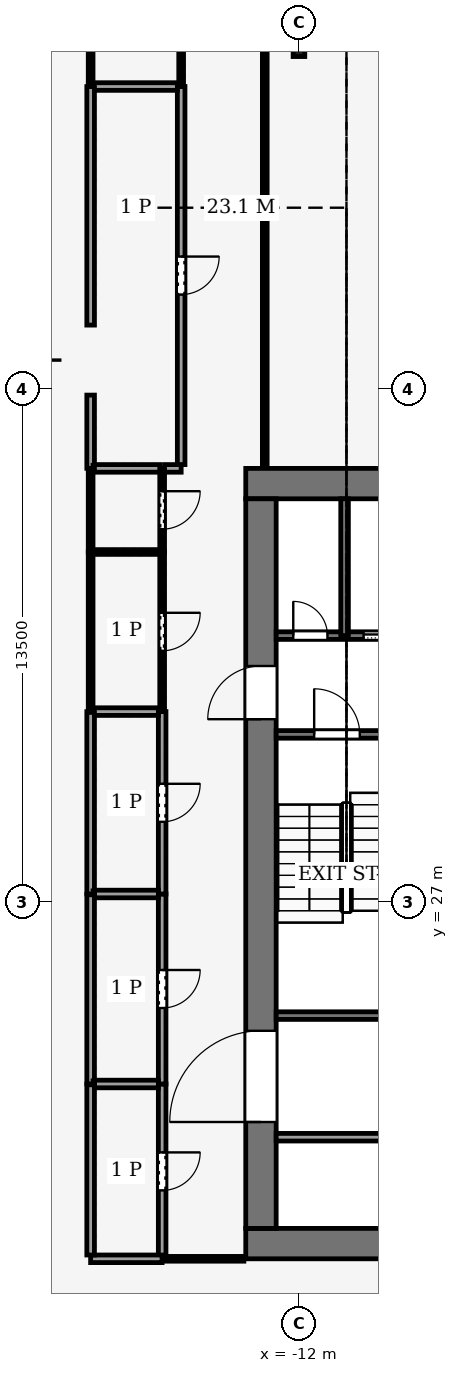
"""IFC4 building model, lengths in metres.
Left out: names, types, materials, properties, quantities, classifications, styles, units other than length and angle.
Written with IfcOpenShell. Run it as: python <this file> out.ifc"""

import sys

from ifc_helpers import new_model, si_unit, direction, frame, frame_2d, origin, origin_2d, place, context, subcontext, project, spatial, rectangle, hollow_rectangle, i_section, extrude, element, fill, save


model = new_model("IFC4")
c1 = context("Model", 3, precision=1e-05, world=origin(), true_north=direction((0.0, 1.0)))
c2 = subcontext(c1, "Body", "Model", "MODEL_VIEW")
j1 = project(units=[si_unit("LENGTHUNIT", "METRE"), si_unit("PLANEANGLEUNIT", "RADIAN")], contexts=[c1])
p1 = place(None, origin())
s1 = spatial("IfcSite", under=j1, at=p1, CompositionType="ELEMENT")
p2 = place(p1, origin())
s2 = spatial("IfcBuilding", under=s1, at=p2, CompositionType="ELEMENT")
p3 = place(p2, frame((0.0, 0.0, 282.0)))
s3 = spatial("IfcBuildingStorey", under=s2, at=p3, CompositionType="ELEMENT", Elevation=282.0)
for number, where, z_axis, x_axis in (
    (1, (-13.4, 18.0, -0.25), (0.0, 0.0, 1.0), (1.0, 0.0, 0.0)),
    (2, (-13.4, 38.0, -0.25), (0.0, 0.0, 1.0), (1.0, 0.0, 0.0)),
):
    element("IfcWall", number, at=place(p3, frame(where, z_axis=z_axis, x_axis=x_axis)), inside=s3, PredefinedType="SHEAR", context=c2, shape_type="SweptSolid", body=[
        extrude(rectangle(XDim=26.8, YDim=0.8, at=frame_2d((13.4, 0.0))), origin(), (0.0, 0.0, 1.0), 7.12),
    ])
p4 = place(p3, frame((-13.0, 18.4, -0.25), z_axis=(0.0, 0.0, 1.0), x_axis=(0.0, 1.0, 0.0)))
e3 = element("IfcWall", 3, at=p4, inside=s3, PredefinedType="SHEAR", context=c2, shape_type="SweptSolid", body=[
    extrude(rectangle(XDim=19.2, YDim=0.8, at=frame_2d((9.6, 0.0))), origin(), (0.0, 0.0, 1.0), 7.12),
])
p5 = place(p4, frame((2.8, 0.0, 0.25)))
e4 = element("IfcOpeningElement", 4, at=p5, cuts=e3, PredefinedType="OPENING", context=c2, shape_type="SweptSolid", body=[
    extrude(rectangle(XDim=2.4, YDim=2.4, at=frame_2d((1.2, 1.2))), frame((0.0, 0.41, 0.0), z_axis=(0.0, -1.0, 0.0), x_axis=(1.0, 0.0, 0.0)), (0.0, 0.0, 1.0), 0.82),
])
p6 = place(p4, frame((13.4, 0.0, 0.25)))
e5 = element("IfcOpeningElement", 5, at=p6, cuts=e3, PredefinedType="OPENING", context=c2, shape_type="SweptSolid", body=[
    extrude(rectangle(XDim=1.4, YDim=2.2, at=frame_2d((0.7, 1.1))), frame((0.0, 0.41, 0.0), z_axis=(0.0, -1.0, 0.0), x_axis=(1.0, 0.0, 0.0)), (0.0, 0.0, 1.0), 0.82),
])
p7 = place(p3, frame((-21.0, 41.25, 0.223), z_axis=(0.386877430339, 0.0, 0.922131147882), x_axis=(0.0, 1.0, 0.0)))
e6 = element("IfcColumn", 6, at=p7, inside=s3, PredefinedType="COLUMN", context=c2, shape_type="SweptSolid", body=[
    extrude(hollow_rectangle(XDim=1.0, YDim=1.0, WallThickness=0.045, at=origin_2d()), origin(), (0.0, 0.0, 1.0), 7.108),
])
p8 = place(p3, frame((-12.0, 49.5, 0.0), z_axis=(0.0, 0.0, 1.0), x_axis=(1.0, 0.0, 0.0)))
e7 = element("IfcColumn", 7, at=p8, inside=s3, PredefinedType="COLUMN", context=c2, shape_type="SweptSolid", body=[
    extrude(i_section(OverallWidth=0.306, OverallDepth=0.524, WebThickness=0.012, FlangeThickness=0.04, FilletRadius=0.027, at=origin_2d()), origin(), (0.0, 0.0, 1.0), 7.0),
])
p9 = place(p3, frame((-12.6, 20.8, 0.0), z_axis=(0.0, 0.0, 1.0), x_axis=(1.0, 0.0, 0.0)))
e8 = element("IfcWall", 8, at=p9, inside=s3, PredefinedType="PARTITIONING", context=c2, shape_type="SweptSolid", body=[
    extrude(rectangle(XDim=6.6, YDim=0.2, at=frame_2d((3.3, 0.0))), origin(), (0.0, 0.0, 1.0), 6.87),
])
p10 = place(p9, frame((2.8, 0.0, 0.0)))
e9 = element("IfcOpeningElement", 9, at=p10, cuts=e8, PredefinedType="OPENING", context=c2, shape_type="SweptSolid", body=[
    extrude(rectangle(XDim=1.0, YDim=2.1, at=frame_2d((0.5, 1.05))), frame((0.0, 0.11, 0.0), z_axis=(0.0, -1.0, 0.0), x_axis=(1.0, 0.0, 0.0)), (0.0, 0.0, 1.0), 0.22),
])
p11 = place(p3, frame((-12.6, 24.0, 0.0), z_axis=(0.0, 0.0, 1.0), x_axis=(1.0, 0.0, 0.0)))
e10 = element("IfcWall", 10, at=p11, inside=s3, PredefinedType="PARTITIONING", context=c2, shape_type="SweptSolid", body=[
    extrude(rectangle(XDim=6.6, YDim=0.2, at=frame_2d((3.3, 0.0))), origin(), (0.0, 0.0, 1.0), 6.87),
])
p12 = place(p11, frame((4.7, 0.0, 0.0)))
e11 = element("IfcOpeningElement", 11, at=p12, cuts=e10, PredefinedType="OPENING", context=c2, shape_type="SweptSolid", body=[
    extrude(rectangle(XDim=1.0, YDim=2.1, at=frame_2d((0.5, 1.05))), frame((0.0, 0.11, 0.0), z_axis=(0.0, -1.0, 0.0), x_axis=(1.0, 0.0, 0.0)), (0.0, 0.0, 1.0), 0.22),
])
p13 = place(p3, frame((-12.6, 31.4, 0.0), z_axis=(0.0, 0.0, 1.0), x_axis=(1.0, 0.0, 0.0)))
e12 = element("IfcWall", 12, at=p13, inside=s3, PredefinedType="PARTITIONING", context=c2, shape_type="SweptSolid", body=[
    extrude(rectangle(XDim=6.6, YDim=0.2, at=frame_2d((3.3, 0.0))), origin(), (0.0, 0.0, 1.0), 6.87),
])
p14 = place(p13, frame((1.0, 0.0, 0.0)))
e13 = element("IfcOpeningElement", 13, at=p14, cuts=e12, PredefinedType="OPENING", context=c2, shape_type="SweptSolid", body=[
    extrude(rectangle(XDim=1.2, YDim=2.2, at=frame_2d((0.6, 1.1))), frame((0.0, 0.11, 0.0), z_axis=(0.0, -1.0, 0.0), x_axis=(1.0, 0.0, 0.0)), (0.0, 0.0, 1.0), 0.22),
])
p15 = place(p3, frame((-12.6, 34.0, 0.0), z_axis=(0.0, 0.0, 1.0), x_axis=(1.0, 0.0, 0.0)))
e14 = element("IfcWall", 14, at=p15, inside=s3, PredefinedType="PARTITIONING", context=c2, shape_type="SweptSolid", body=[
    extrude(rectangle(XDim=6.6, YDim=0.2, at=frame_2d((3.3, 0.0))), origin(), (0.0, 0.0, 1.0), 6.87),
])
p16 = place(p15, frame((4.7, 0.0, 0.0)))
e15 = element("IfcOpeningElement", 15, at=p16, cuts=e14, PredefinedType="OPENING", context=c2, shape_type="SweptSolid", body=[
    extrude(rectangle(XDim=1.4, YDim=2.2, at=frame_2d((0.7, 1.1))), frame((0.0, 0.11, 0.0), z_axis=(0.0, -1.0, 0.0), x_axis=(1.0, 0.0, 0.0)), (0.0, 0.0, 1.0), 0.22),
])
p17 = place(p15, frame((2.3, 0.0, 0.0)))
e16 = element("IfcOpeningElement", 16, at=p17, cuts=e14, PredefinedType="OPENING", context=c2, shape_type="SweptSolid", body=[
    extrude(rectangle(XDim=1.4, YDim=2.2, at=frame_2d((0.7, 1.1))), frame((0.0, 0.11, 0.0), z_axis=(0.0, -1.0, 0.0), x_axis=(1.0, 0.0, 0.0)), (0.0, 0.0, 1.0), 0.22),
])
p18 = place(p15, frame((0.45, 0.0, 0.0)))
e17 = element("IfcOpeningElement", 17, at=p18, cuts=e14, PredefinedType="OPENING", context=c2, shape_type="SweptSolid", body=[
    extrude(rectangle(XDim=0.9, YDim=2.1, at=frame_2d((0.45, 1.05))), frame((0.0, 0.11, 0.0), z_axis=(0.0, -1.0, 0.0), x_axis=(1.0, 0.0, 0.0)), (0.0, 0.0, 1.0), 0.22),
])
p19 = place(p3, frame((-10.8, 34.0, 0.0), z_axis=(0.0, 0.0, 1.0), x_axis=(0.0, 1.0, 0.0)))
e18 = element("IfcWall", 18, at=p19, inside=s3, PredefinedType="PARTITIONING", context=c2, shape_type="SweptSolid", body=[
    extrude(rectangle(XDim=3.6, YDim=0.2, at=frame_2d((1.8, 0.0))), origin(), (0.0, 0.0, 1.0), 6.87),
])
p20 = place(p3, frame((-15.6, 22.2, 0.0), z_axis=(0.0, 0.0, 1.0), x_axis=(0.0, -1.0, 0.0)))
e19 = element("IfcWall", 19, at=p20, inside=s3, PredefinedType="PARTITIONING", context=c2, shape_type="SweptSolid", body=[
    extrude(rectangle(XDim=4.6, YDim=0.2, at=frame_2d((2.3, 0.0))), origin(), (0.0, 0.0, 1.0), 6.14),
])
p21 = place(p20, frame((1.8, 0.0, 0.0)))
e20 = element("IfcOpeningElement", 20, at=p21, cuts=e19, PredefinedType="OPENING", context=c2, shape_type="SweptSolid", body=[
    extrude(rectangle(XDim=1.0, YDim=2.1, at=frame_2d((0.5, 1.05))), frame((0.0, 0.11, 0.0), z_axis=(0.0, -1.0, 0.0), x_axis=(1.0, 0.0, 0.0)), (0.0, 0.0, 1.0), 0.22),
])
p22 = place(p3, frame((-15.6, 27.2, 0.0), z_axis=(0.0, 0.0, 1.0), x_axis=(0.0, -1.0, 0.0)))
e21 = element("IfcWall", 21, at=p22, inside=s3, PredefinedType="PARTITIONING", context=c2, shape_type="SweptSolid", body=[
    extrude(rectangle(XDim=5.0, YDim=0.2, at=frame_2d((2.5, 0.0))), origin(), (0.0, 0.0, 1.0), 6.48),
])
p23 = place(p22, frame((2.0, 0.0, 0.0)))
e22 = element("IfcOpeningElement", 22, at=p23, cuts=e21, PredefinedType="OPENING", context=c2, shape_type="SweptSolid", body=[
    extrude(rectangle(XDim=1.0, YDim=2.1, at=frame_2d((0.5, 1.05))), frame((0.0, 0.11, 0.0), z_axis=(0.0, -1.0, 0.0), x_axis=(1.0, 0.0, 0.0)), (0.0, 0.0, 1.0), 0.22),
])
p24 = place(p3, frame((-15.6, 32.0, 0.0), z_axis=(0.0, 0.0, 1.0), x_axis=(0.0, -1.0, 0.0)))
e23 = element("IfcWall", 23, at=p24, inside=s3, PredefinedType="PARTITIONING", context=c2, shape_type="SweptSolid", body=[
    extrude(rectangle(XDim=4.8, YDim=0.2, at=frame_2d((2.4, 0.0))), origin(), (0.0, 0.0, 1.0), 6.48),
])
p25 = place(p24, frame((1.9, 0.0, 0.0)))
e24 = element("IfcOpeningElement", 24, at=p25, cuts=e23, PredefinedType="OPENING", context=c2, shape_type="SweptSolid", body=[
    extrude(rectangle(XDim=1.0, YDim=2.1, at=frame_2d((0.5, 1.05))), frame((0.0, 0.11, 0.0), z_axis=(0.0, -1.0, 0.0), x_axis=(1.0, 0.0, 0.0)), (0.0, 0.0, 1.0), 0.22),
])
p26 = place(p3, frame((-15.6, 36.2, 0.0), z_axis=(0.0, 0.0, 1.0), x_axis=(0.0, -1.0, 0.0)))
e25 = element("IfcWall", 25, at=p26, inside=s3, PredefinedType="PARTITIONING", context=c2, shape_type="SweptSolid", body=[
    extrude(rectangle(XDim=4.2, YDim=0.125, at=frame_2d((2.1, 0.0))), origin(), (0.0, 0.0, 1.0), 6.48),
])
p27 = place(p26, frame((1.6, 0.0, 0.0)))
e26 = element("IfcOpeningElement", 26, at=p27, cuts=e25, PredefinedType="OPENING", context=c2, shape_type="SweptSolid", body=[
    extrude(rectangle(XDim=1.0, YDim=2.1, at=frame_2d((0.5, 1.05))), frame((0.0, 0.073, 0.0), z_axis=(0.0, -1.0, 0.0), x_axis=(1.0, 0.0, 0.0)), (0.0, 0.0, 1.0), 0.145),
])
p28 = place(p3, frame((-15.6, 38.4, 0.0), z_axis=(0.0, 0.0, 1.0), x_axis=(0.0, -1.0, 0.0)))
e27 = element("IfcWall", 27, at=p28, inside=s3, PredefinedType="PARTITIONING", context=c2, shape_type="SweptSolid", body=[
    extrude(rectangle(XDim=2.2, YDim=0.125, at=frame_2d((1.1, 0.0))), origin(), (0.0, 0.0, 1.0), 6.14),
])
p29 = place(p28, frame((0.6, 0.0, 0.0)))
e28 = element("IfcOpeningElement", 28, at=p29, cuts=e27, PredefinedType="OPENING", context=c2, shape_type="SweptSolid", body=[
    extrude(rectangle(XDim=1.0, YDim=2.1, at=frame_2d((0.5, 1.05))), frame((0.0, 0.073, 0.0), z_axis=(0.0, -1.0, 0.0), x_axis=(1.0, 0.0, 0.0)), (0.0, 0.0, 1.0), 0.145),
])
p30 = place(p3, frame((-15.538, 38.4, 0.0), z_axis=(0.0, 0.0, 1.0), x_axis=(1.0, 0.0, 0.0)))
e29 = element("IfcWall", 29, at=p30, inside=s3, PredefinedType="PARTITIONING", context=c2, shape_type="SweptSolid", body=[
    extrude(rectangle(XDim=0.438, YDim=0.2, at=frame_2d((0.219, 0.0))), origin(), (0.0, 0.0, 1.0), 6.14),
])
p31 = place(p3, frame((-15.1, 48.449, 0.0), z_axis=(0.0, 0.0, 1.0), x_axis=(0.0, -1.0, 0.0)))
e30 = element("IfcWall", 30, at=p31, inside=s3, PredefinedType="PARTITIONING", context=c2, shape_type="SweptSolid", body=[
    extrude(rectangle(XDim=9.949, YDim=0.2, at=frame_2d((4.975, 0.0))), origin(), (0.0, 0.0, 1.0), 6.14),
])
p32 = place(p31, frame((4.475, 0.0, 0.0)))
e31 = element("IfcOpeningElement", 31, at=p32, cuts=e30, PredefinedType="OPENING", context=c2, shape_type="SweptSolid", body=[
    extrude(rectangle(XDim=1.0, YDim=2.1, at=frame_2d((0.5, 1.05))), frame((0.0, 0.11, 0.0), z_axis=(0.0, -1.0, 0.0), x_axis=(1.0, 0.0, 0.0)), (0.0, 0.0, 1.0), 0.22),
])
p33 = place(p3, frame((-15.1, 58.498, 0.0), z_axis=(0.0, 0.0, 1.0), x_axis=(0.0, -1.0, 0.0)))
e32 = element("IfcWall", 32, at=p33, inside=s3, PredefinedType="PARTITIONING", context=c2, shape_type="SweptSolid", body=[
    extrude(rectangle(XDim=10.049, YDim=0.125, at=frame_2d((5.024, 0.0))), origin(), (0.0, 0.0, 1.0), 6.35),
])
p34 = place(p33, frame((4.125, 0.0, 0.0)))
e33 = element("IfcOpeningElement", 33, at=p34, cuts=e32, PredefinedType="OPENING", context=c2, shape_type="SweptSolid", body=[
    extrude(rectangle(XDim=1.8, YDim=2.4, at=frame_2d((0.9, 1.2))), frame((0.0, 0.073, 0.0), z_axis=(0.0, -1.0, 0.0), x_axis=(1.0, 0.0, 0.0)), (0.0, 0.0, 1.0), 0.145),
])
for number, where, z_axis, x_axis in (
    (34, (-17.482, 22.2, 0.0), (0.0, 0.0, 1.0), (1.0, 0.0, 0.0)),
    (35, (-17.482, 27.2, 0.0), (0.0, 0.0, 1.0), (1.0, 0.0, 0.0)),
    (36, (-17.482, 32.0, 0.0), (0.0, 0.0, 1.0), (1.0, 0.0, 0.0)),
):
    element("IfcWall", number, at=place(p3, frame(where, z_axis=z_axis, x_axis=x_axis)), inside=s3, PredefinedType="PARTITIONING", context=c2, shape_type="SweptSolid", body=[
        extrude(rectangle(XDim=1.782, YDim=0.2, at=frame_2d((0.891, 0.0))), origin(), (0.0, 0.0, 1.0), 6.87),
    ])
p35 = place(p3, frame((-17.482, 36.2, 0.0), z_axis=(0.0, 0.0, 1.0), x_axis=(1.0, 0.0, 0.0)))
e37 = element("IfcWall", 37, at=p35, inside=s3, PredefinedType="PARTITIONING", context=c2, shape_type="SweptSolid", body=[
    extrude(rectangle(XDim=1.819, YDim=0.125, at=frame_2d((0.91, 0.0))), origin(), (0.0, 0.0, 1.0), 6.87),
])
p36 = place(p3, frame((-17.482, 38.4, 0.0), z_axis=(0.0, 0.0, 1.0), x_axis=(1.0, 0.0, 0.0)))
e38 = element("IfcWall", 38, at=p36, inside=s3, PredefinedType="PARTITIONING", context=c2, shape_type="SweptSolid", body=[
    extrude(rectangle(XDim=1.819, YDim=0.2, at=frame_2d((0.91, 0.0))), origin(), (0.0, 0.0, 1.0), 6.14),
])
p37 = place(p3, frame((-17.482, 48.449, 0.0), z_axis=(0.0, 0.0, 1.0), x_axis=(1.0, 0.0, 0.0)))
e39 = element("IfcWall", 39, at=p37, inside=s3, PredefinedType="PARTITIONING", context=c2, shape_type="SweptSolid", body=[
    extrude(rectangle(XDim=2.282, YDim=0.2, at=frame_2d((1.141, 0.0))), origin(), (0.0, 0.0, 1.0), 6.39),
])
p38 = place(p3, frame((-13.45, 17.6, 0.0), z_axis=(0.0, 0.0, 1.0), x_axis=(-1.0, 0.0, 0.0)))
e40 = element("IfcWall", 40, at=p38, inside=s3, PredefinedType="PARTITIONING", context=c2, shape_type="SweptSolid", body=[
    extrude(rectangle(XDim=2.148, YDim=0.125, at=frame_2d((1.074, 0.0))), origin(), (0.0, 0.0, 1.0), 6.14),
])
p39 = place(p3, frame((-12.9, 66.958, 0.0), z_axis=(0.0, 0.0, 1.0), x_axis=(0.0, -1.0, 0.0)))
e41 = element("IfcWall", 41, at=p39, inside=s3, PredefinedType="PARTITIONING", context=c2, shape_type="SweptSolid", body=[
    extrude(rectangle(XDim=28.508, YDim=0.125, at=frame_2d((14.254, 0.0))), origin(), (0.0, 0.0, 1.0), 6.35),
])
p40 = place(p3, frame((-15.602, 17.6, 0.0), z_axis=(0.0, 0.0, 1.0), x_axis=(-1.0, 0.0, 0.0)))
e42 = element("IfcWall", 42, at=p40, inside=s3, PredefinedType="PARTITIONING", context=c2, shape_type="SweptSolid", body=[
    extrude(rectangle(XDim=1.88, YDim=0.2, at=frame_2d((0.94, 0.0))), origin(), (0.0, 0.0, 1.0), 6.14),
])
p41 = place(p3, frame((-17.482, 17.7, 0.0), z_axis=(0.0, 0.0, 1.0), x_axis=(0.0, 1.0, 0.0)))
e43 = element("IfcWall", 43, at=p41, inside=s3, PredefinedType="PARTITIONING", context=c2, shape_type="SweptSolid", body=[
    extrude(rectangle(XDim=4.498, YDim=0.2, at=frame_2d((2.249, 0.0))), origin(), (0.0, 0.0, 1.0), 6.14),
])
p42 = place(p3, frame((-17.482, 22.202, 0.0), z_axis=(0.0, 0.0, 1.0), x_axis=(0.0, 1.0, 0.0)))
e44 = element("IfcWall", 44, at=p42, inside=s3, PredefinedType="PARTITIONING", context=c2, shape_type="SweptSolid", body=[
    extrude(rectangle(XDim=4.996, YDim=0.2, at=frame_2d((2.498, 0.0))), origin(), (0.0, 0.0, 1.0), 6.48),
])
p43 = place(p3, frame((-17.482, 27.202, 0.0), z_axis=(0.0, 0.0, 1.0), x_axis=(0.0, 1.0, 0.0)))
e45 = element("IfcWall", 45, at=p43, inside=s3, PredefinedType="PARTITIONING", context=c2, shape_type="SweptSolid", body=[
    extrude(rectangle(XDim=4.796, YDim=0.2, at=frame_2d((2.398, 0.0))), origin(), (0.0, 0.0, 1.0), 6.48),
])
p44 = place(p3, frame((-17.482, 32.002, 0.0), z_axis=(0.0, 0.0, 1.0), x_axis=(0.0, 1.0, 0.0)))
e46 = element("IfcWall", 46, at=p44, inside=s3, PredefinedType="PARTITIONING", context=c2, shape_type="SweptSolid", body=[
    extrude(rectangle(XDim=4.196, YDim=0.125, at=frame_2d((2.098, 0.0))), origin(), (0.0, 0.0, 1.0), 6.48),
])
p45 = place(p3, frame((-17.482, 36.202, 0.0), z_axis=(0.0, 0.0, 1.0), x_axis=(0.0, 1.0, 0.0)))
e47 = element("IfcWall", 47, at=p45, inside=s3, PredefinedType="PARTITIONING", context=c2, shape_type="SweptSolid", body=[
    extrude(rectangle(XDim=2.196, YDim=0.125, at=frame_2d((1.098, 0.0))), origin(), (0.0, 0.0, 1.0), 6.14),
])
p46 = place(p3, frame((-17.482, 38.402, 0.0), z_axis=(0.0, 0.0, 1.0), x_axis=(0.0, 1.0, 0.0)))
e48 = element("IfcWall", 48, at=p46, inside=s3, PredefinedType="PARTITIONING", context=c2, shape_type="SweptSolid", body=[
    extrude(rectangle(XDim=1.927, YDim=0.2, at=frame_2d((0.963, 0.0))), origin(), (0.0, 0.0, 1.0), 6.14),
])
p47 = place(p3, frame((-17.482, 42.171, 0.0), z_axis=(0.0, 0.0, 1.0), x_axis=(0.0, 1.0, 0.0)))
e49 = element("IfcWall", 49, at=p47, inside=s3, PredefinedType="PARTITIONING", context=c2, shape_type="SweptSolid", body=[
    extrude(rectangle(XDim=6.276, YDim=0.2, at=frame_2d((3.138, 0.0))), origin(), (0.0, 0.0, 1.0), 6.87),
])
p48 = place(p3, frame((-17.482, 48.451, 0.0), z_axis=(0.0, 0.0, 1.0), x_axis=(0.0, 1.0, 0.0)))
e50 = element("IfcWall", 50, at=p48, inside=s3, PredefinedType="PARTITIONING", context=c2, shape_type="SweptSolid", body=[
    extrude(rectangle(XDim=10.045, YDim=0.125, at=frame_2d((5.022, 0.0))), origin(), (0.0, 0.0, 1.0), 6.35),
])
p49 = place(p17, origin())
e51 = element("IfcDoor", 51, at=p49, inside=s3, OperationType="SLIDING_TO_LEFT", PredefinedType="DOOR", context=c2, shape_type="SweptSolid", body=[
    extrude(rectangle(XDim=1.4, YDim=2.2, at=frame_2d((0.7, 1.1))), frame((0.0, 0.025, 0.0), z_axis=(0.0, -1.0, 0.0), x_axis=(1.0, 0.0, 0.0)), (0.0, 0.0, 1.0), 0.05),
])
fill(e16, e51)
p50 = place(p18, origin())
e52 = element("IfcDoor", 52, at=p50, inside=s3, OperationType="SINGLE_SWING_RIGHT", PredefinedType="DOOR", context=c2, shape_type="SweptSolid", body=[
    extrude(rectangle(XDim=0.9, YDim=2.1, at=frame_2d((0.45, 1.05))), frame((0.0, 0.025, 0.0), z_axis=(0.0, -1.0, 0.0), x_axis=(1.0, 0.0, 0.0)), (0.0, 0.0, 1.0), 0.05),
])
fill(e17, e52)
p51 = place(p14, origin())
e53 = element("IfcDoor", 53, at=p51, inside=s3, OperationType="SINGLE_SWING_LEFT", PredefinedType="DOOR", context=c2, shape_type="SweptSolid", body=[
    extrude(rectangle(XDim=1.2, YDim=2.2, at=frame_2d((0.6, 1.1))), frame((0.0, 0.025, 0.0), z_axis=(0.0, -1.0, 0.0), x_axis=(1.0, 0.0, 0.0)), (0.0, 0.0, 1.0), 0.05),
])
fill(e13, e53)
p52 = place(p5, origin())
e54 = element("IfcDoor", 54, at=p52, inside=s3, OperationType="DOUBLE_DOOR_SINGLE_SWING", PredefinedType="DOOR", context=c2, shape_type="SweptSolid", body=[
    extrude(rectangle(XDim=2.4, YDim=2.4, at=frame_2d((1.2, 1.2))), frame((0.0, 0.025, 0.0), z_axis=(0.0, -1.0, 0.0), x_axis=(1.0, 0.0, 0.0)), (0.0, 0.0, 1.0), 0.05),
])
fill(e4, e54)
p53 = place(p6, origin())
e55 = element("IfcDoor", 55, at=p53, inside=s3, OperationType="SINGLE_SWING_LEFT", PredefinedType="DOOR", context=c2, shape_type="SweptSolid", body=[
    extrude(rectangle(XDim=1.4, YDim=2.2, at=frame_2d((0.7, 1.1))), frame((0.0, 0.025, 0.0), z_axis=(0.0, -1.0, 0.0), x_axis=(1.0, 0.0, 0.0)), (0.0, 0.0, 1.0), 0.05),
])
fill(e5, e55)
p54 = place(p21, origin())
e56 = element("IfcDoor", 56, at=p54, inside=s3, OperationType="SINGLE_SWING_LEFT", PredefinedType="DOOR", context=c2, shape_type="SweptSolid", body=[
    extrude(rectangle(XDim=1.0, YDim=2.1, at=frame_2d((0.5, 1.05))), frame((0.0, 0.025, 0.0), z_axis=(0.0, -1.0, 0.0), x_axis=(1.0, 0.0, 0.0)), (0.0, 0.0, 1.0), 0.05),
])
fill(e20, e56)
p55 = place(p23, origin())
e57 = element("IfcDoor", 57, at=p55, inside=s3, OperationType="SINGLE_SWING_RIGHT", PredefinedType="DOOR", context=c2, shape_type="SweptSolid", body=[
    extrude(rectangle(XDim=1.0, YDim=2.1, at=frame_2d((0.5, 1.05))), frame((0.0, 0.025, 0.0), z_axis=(0.0, -1.0, 0.0), x_axis=(1.0, 0.0, 0.0)), (0.0, 0.0, 1.0), 0.05),
])
fill(e22, e57)
p56 = place(p25, origin())
e58 = element("IfcDoor", 58, at=p56, inside=s3, OperationType="SINGLE_SWING_LEFT", PredefinedType="DOOR", context=c2, shape_type="SweptSolid", body=[
    extrude(rectangle(XDim=1.0, YDim=2.1, at=frame_2d((0.5, 1.05))), frame((0.0, 0.025, 0.0), z_axis=(0.0, -1.0, 0.0), x_axis=(1.0, 0.0, 0.0)), (0.0, 0.0, 1.0), 0.05),
])
fill(e24, e58)
p57 = place(p27, origin())
e59 = element("IfcDoor", 59, at=p57, inside=s3, OperationType="SINGLE_SWING_RIGHT", PredefinedType="DOOR", context=c2, shape_type="SweptSolid", body=[
    extrude(rectangle(XDim=1.0, YDim=2.1, at=frame_2d((0.5, 1.05))), frame((0.0, 0.025, 0.0), z_axis=(0.0, -1.0, 0.0), x_axis=(1.0, 0.0, 0.0)), (0.0, 0.0, 1.0), 0.05),
])
fill(e26, e59)
p58 = place(p29, origin())
e60 = element("IfcDoor", 60, at=p58, inside=s3, OperationType="SINGLE_SWING_LEFT", PredefinedType="DOOR", context=c2, shape_type="SweptSolid", body=[
    extrude(rectangle(XDim=1.0, YDim=2.1, at=frame_2d((0.5, 1.05))), frame((0.0, 0.025, 0.0), z_axis=(0.0, -1.0, 0.0), x_axis=(1.0, 0.0, 0.0)), (0.0, 0.0, 1.0), 0.05),
])
fill(e28, e60)
p59 = place(p32, origin())
e61 = element("IfcDoor", 61, at=p59, inside=s3, OperationType="SINGLE_SWING_RIGHT", PredefinedType="DOOR", context=c2, shape_type="SweptSolid", body=[
    extrude(rectangle(XDim=1.0, YDim=2.1, at=frame_2d((0.5, 1.05))), frame((0.0, 0.025, 0.0), z_axis=(0.0, -1.0, 0.0), x_axis=(1.0, 0.0, 0.0)), (0.0, 0.0, 1.0), 0.05),
])
fill(e31, e61)
save(model, sys.argv[1])
